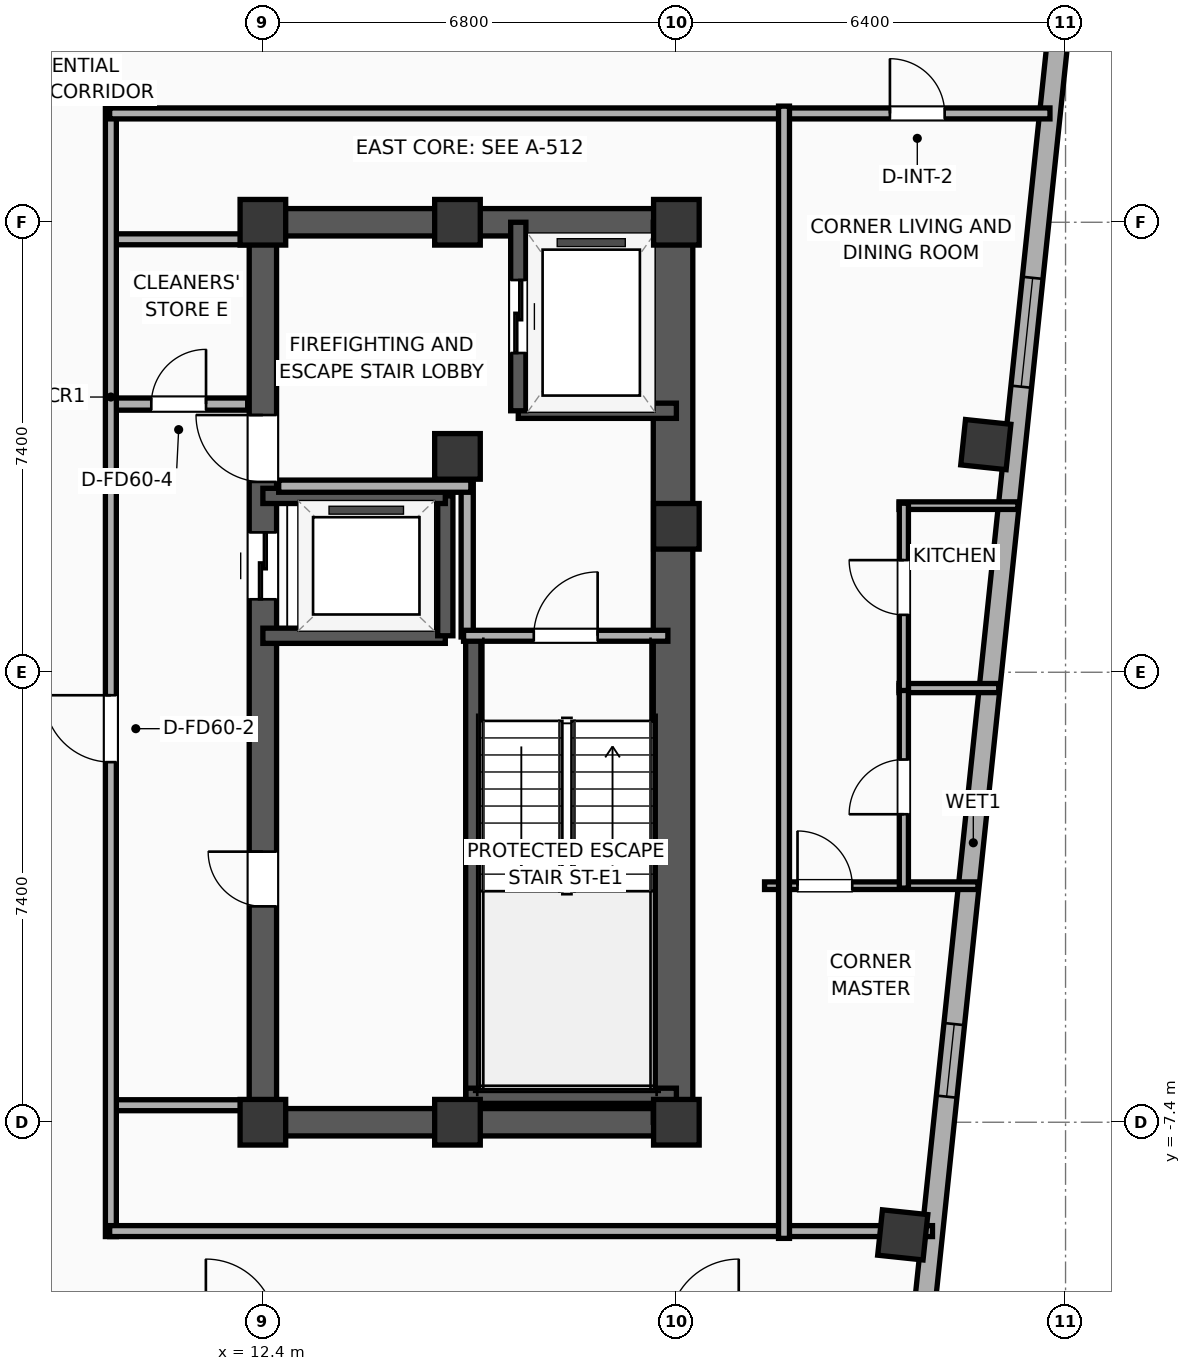
"""IFC4 building model, lengths in metres.
Left out: names, types, materials, properties, quantities, classifications, styles, units other than length and angle.
Written with IfcOpenShell. Run it as: python <this file> out.ifc"""

import sys

from ifc_helpers import new_model, si_unit, direction, frame, frame_2d, origin, origin_2d, place, context, subcontext, project, spatial, rectangle, hollow_rectangle, extrude, element, fill, save


model = new_model("IFC4")
c1 = context("Model", 3, precision=1e-05, world=origin(), true_north=direction((0.0, 1.0)))
c2 = subcontext(c1, "Body", "Model", "MODEL_VIEW")
j1 = project(units=[si_unit("LENGTHUNIT", "METRE"), si_unit("PLANEANGLEUNIT", "RADIAN")], contexts=[c1])
p1 = place(None, origin())
s1 = spatial("IfcSite", under=j1, at=p1, CompositionType="ELEMENT")
p2 = place(p1, origin())
s2 = spatial("IfcBuilding", under=s1, at=p2, CompositionType="ELEMENT")
p3 = place(p2, frame((0.0, 0.0, 283.4)))
s3 = spatial("IfcBuildingStorey", under=s2, at=p3, CompositionType="ELEMENT", Elevation=283.4)
for number, where, z_axis, x_axis in (
    (1, (12.4, -7.4, 0.0), (0.0, 0.0, 1.0), (1.0, 0.0, 0.0)),
    (2, (15.6, 3.55, 0.0), (0.0, 0.0, 1.0), (1.0, 0.0, 0.0)),
    (3, (12.4, 7.4, 0.0), (0.0, 0.0, 1.0), (1.0, 0.0, 0.0)),
    (4, (15.6, -7.4, 0.0), (0.0, 0.0, 1.0), (1.0, 0.0, 0.0)),
    (5, (15.6, 7.4, 0.0), (0.0, 0.0, 1.0), (1.0, 0.0, 0.0)),
    (6, (19.2, -7.4, 0.0), (0.0, 0.0, 1.0), (1.0, 0.0, 0.0)),
    (7, (19.2, 2.4, 0.0), (0.0, 0.0, 1.0), (1.0, 0.0, 0.0)),
    (8, (19.2, 7.4, 0.0), (0.0, 0.0, 1.0), (1.0, 0.0, 0.0)),
):
    element("IfcColumn", number, at=place(p3, frame(where, z_axis=z_axis, x_axis=x_axis)), inside=s3, PredefinedType="COLUMN", context=c2, shape_type="SweptSolid", body=[
        extrude(rectangle(XDim=0.75, YDim=0.75, at=origin_2d()), origin(), (0.0, 0.0, 1.0), 3.9),
    ])
for number, where, z_axis, x_axis in (
    (9, (12.175, -7.4, 0.0), (0.0, 0.0, 1.0), (1.0, 0.0, 0.0)),
    (10, (12.175, 7.4, 0.0), (0.0, 0.0, 1.0), (1.0, 0.0, 0.0)),
):
    element("IfcWall", number, at=place(p3, frame(where, z_axis=z_axis, x_axis=x_axis)), inside=s3, PredefinedType="SHEAR", context=c2, shape_type="SweptSolid", body=[
        extrude(rectangle(XDim=7.25, YDim=0.45, at=frame_2d((3.625, 0.0))), origin(), (0.0, 0.0, 1.0), 3.65),
    ])
p4 = place(p3, frame((12.4, -7.4, 0.0), z_axis=(0.0, 0.0, 1.0), x_axis=(0.0, 1.0, 0.0)))
e11 = element("IfcWall", 11, at=p4, inside=s3, PredefinedType="SHEAR", context=c2, shape_type="SweptSolid", body=[
    extrude(rectangle(XDim=14.8, YDim=0.45, at=frame_2d((7.4, 0.0))), origin(), (0.0, 0.0, 1.0), 3.65),
])
p5 = place(p4, frame((8.6, 0.0, 0.0)))
e12 = element("IfcOpeningElement", 12, at=p5, cuts=e11, PredefinedType="OPENING", context=c2, shape_type="SweptSolid", body=[
    extrude(rectangle(XDim=1.1, YDim=2.05, at=frame_2d((0.55, 1.025))), frame((0.0, 0.235, 0.0), z_axis=(0.0, -1.0, 0.0), x_axis=(1.0, 0.0, 0.0)), (0.0, 0.0, 1.0), 0.47),
])
p6 = place(p4, frame((10.53, 0.0, 0.0)))
e13 = element("IfcOpeningElement", 13, at=p6, cuts=e11, PredefinedType="OPENING", context=c2, shape_type="SweptSolid", body=[
    extrude(rectangle(XDim=1.1, YDim=2.05, at=frame_2d((0.55, 1.025))), frame((0.0, 0.235, 0.0), z_axis=(0.0, -1.0, 0.0), x_axis=(1.0, 0.0, 0.0)), (0.0, 0.0, 1.0), 0.47),
])
p7 = place(p4, frame((3.55, 0.0, 0.0)))
e14 = element("IfcOpeningElement", 14, at=p7, cuts=e11, PredefinedType="OPENING", context=c2, shape_type="SweptSolid", body=[
    extrude(rectangle(XDim=0.9, YDim=2.05, at=frame_2d((0.45, 1.025))), frame((0.0, 0.235, 0.0), z_axis=(0.0, -1.0, 0.0), x_axis=(1.0, 0.0, 0.0)), (0.0, 0.0, 1.0), 0.47),
])
p8 = place(p3, frame((19.145, -7.4, 0.0), z_axis=(0.0, 0.0, 1.0), x_axis=(0.0, 1.0, 0.0)))
e15 = element("IfcWall", 15, at=p8, inside=s3, PredefinedType="SHEAR", context=c2, shape_type="SweptSolid", body=[
    extrude(rectangle(XDim=14.8, YDim=0.65, at=frame_2d((7.4, 0.0))), origin(), (0.0, 0.0, 1.0), 3.65),
])
p9 = place(p3, frame((15.86, -7.085, 0.0), z_axis=(0.0, 0.0, 1.0), x_axis=(0.0, 1.0, 0.0)))
e16 = element("IfcWall", 16, at=p9, inside=s3, PredefinedType="SOLIDWALL", context=c2, shape_type="SweptSolid", body=[
    extrude(rectangle(XDim=7.685, YDim=0.25, at=frame_2d((3.843, 0.0))), origin(), (0.0, 0.0, 1.0), 3.65),
])
p10 = place(p3, frame((15.74, -6.965, 0.0), z_axis=(0.0, 0.0, 1.0), x_axis=(1.0, 0.0, 0.0)))
e17 = element("IfcWall", 17, at=p10, inside=s3, PredefinedType="SOLIDWALL", context=c2, shape_type="SweptSolid", body=[
    extrude(rectangle(XDim=3.46, YDim=0.25, at=frame_2d((1.73, 0.0))), origin(), (0.0, 0.0, 1.0), 3.65),
])
for number, where, z_axis, x_axis in (
    (18, (22.923, -9.252, 0.0), (0.0, 0.0, 1.0), (0.995, -0.105, 0.0)),
    (19, (24.289, 3.744, 0.0), (0.0, 0.0, 1.0), (0.995, -0.105, 0.0)),
):
    element("IfcColumn", number, at=place(p3, frame(where, z_axis=z_axis, x_axis=x_axis)), inside=s3, PredefinedType="COLUMN", context=c2, shape_type="SweptSolid", body=[
        extrude(hollow_rectangle(XDim=0.75, YDim=0.75, WallThickness=0.025, at=origin_2d()), origin(), (0.0, 0.0, 1.0), 3.9),
    ])
p11 = place(p3, frame((25.67, 12.296, 0.0), z_axis=(0.0, 0.0, 1.0), x_axis=(-0.104533282919, -0.994521388791, 0.0)))
e20 = element("IfcWall", 20, at=p11, inside=s3, PredefinedType="ELEMENTEDWALL", context=c2, shape_type="SweptSolid", body=[
    extrude(rectangle(XDim=30.366, YDim=0.34, at=frame_2d((15.183, 0.0))), origin(), (0.0, 0.0, 1.0), 3.65),
])
p12 = place(p11, frame((5.842, 0.0, 0.75)))
e21 = element("IfcOpeningElement", 21, at=p12, cuts=e20, PredefinedType="OPENING", context=c2, shape_type="SweptSolid", body=[
    extrude(rectangle(XDim=1.8, YDim=2.1, at=frame_2d((0.9, 1.05))), frame((0.0, 0.18, 0.0), z_axis=(0.0, -1.0, 0.0), x_axis=(1.0, 0.0, 0.0)), (0.0, 0.0, 1.0), 0.36),
])
p13 = place(p11, frame((23.525, 0.0, 0.75)))
e22 = element("IfcOpeningElement", 22, at=p13, cuts=e20, PredefinedType="OPENING", context=c2, shape_type="SweptSolid", body=[
    extrude(rectangle(XDim=1.8, YDim=2.1, at=frame_2d((0.9, 1.05))), frame((0.0, 0.18, 0.0), z_axis=(0.0, -1.0, 0.0), x_axis=(1.0, 0.0, 0.0)), (0.0, 0.0, 1.0), 0.36),
])
p14 = place(p11, frame((27.368, 0.0, 0.75)))
e23 = element("IfcOpeningElement", 23, at=p14, cuts=e20, PredefinedType="OPENING", context=c2, shape_type="SweptSolid", body=[
    extrude(rectangle(XDim=1.2, YDim=2.05, at=frame_2d((0.6, 1.025))), frame((0.0, 0.18, 0.0), z_axis=(0.0, -1.0, 0.0), x_axis=(1.0, 0.0, 0.0)), (0.0, 0.0, 1.0), 0.36),
])
p15 = place(p11, frame((18.181, 0.0, 0.75)))
e24 = element("IfcOpeningElement", 24, at=p15, cuts=e20, PredefinedType="OPENING", context=c2, shape_type="SweptSolid", body=[
    extrude(rectangle(XDim=1.2, YDim=2.05, at=frame_2d((0.6, 1.025))), frame((0.0, 0.18, 0.0), z_axis=(0.0, -1.0, 0.0), x_axis=(1.0, 0.0, 0.0)), (0.0, 0.0, 1.0), 0.36),
])
p16 = place(p3, frame((16.6, 4.3, 0.0), z_axis=(0.0, 0.0, 1.0), x_axis=(1.0, 0.0, 0.0)))
e25 = element("IfcWall", 25, at=p16, inside=s3, PredefinedType="SOLIDWALL", context=c2, shape_type="SweptSolid", body=[
    extrude(rectangle(XDim=2.6, YDim=0.25, at=frame_2d((1.3, 0.0))), origin(), (0.0, 0.0, 1.0), 3.65),
])
p17 = place(p3, frame((16.6, 7.4, 0.0), z_axis=(0.0, 0.0, 1.0), x_axis=(0.0, -1.0, 0.0)))
e26 = element("IfcWall", 26, at=p17, inside=s3, PredefinedType="SOLIDWALL", context=c2, shape_type="SweptSolid", body=[
    extrude(rectangle(XDim=3.1, YDim=0.25, at=frame_2d((1.55, 0.0))), origin(), (0.0, 0.0, 1.0), 3.65),
])
p18 = place(p17, frame((0.95, 0.0, 0.0)))
e27 = element("IfcOpeningElement", 27, at=p18, cuts=e26, PredefinedType="OPENING", context=c2, shape_type="SweptSolid", body=[
    extrude(rectangle(XDim=1.2, YDim=2.05, at=frame_2d((0.6, 1.025))), frame((0.0, 0.135, 0.0), z_axis=(0.0, -1.0, 0.0), x_axis=(1.0, 0.0, 0.0)), (0.0, 0.0, 1.0), 0.27),
])
p19 = place(p3, frame((12.4, 0.6, 0.0), z_axis=(0.0, 0.0, 1.0), x_axis=(1.0, 0.0, 0.0)))
e28 = element("IfcWall", 28, at=p19, inside=s3, PredefinedType="SOLIDWALL", context=c2, shape_type="SweptSolid", body=[
    extrude(rectangle(XDim=3.0, YDim=0.25, at=frame_2d((1.5, 0.0))), origin(), (0.0, 0.0, 1.0), 3.65),
])
p20 = place(p3, frame((15.4, 0.6, 0.0), z_axis=(0.0, 0.0, 1.0), x_axis=(0.0, 1.0, 0.0)))
e29 = element("IfcWall", 29, at=p20, inside=s3, PredefinedType="SOLIDWALL", context=c2, shape_type="SweptSolid", body=[
    extrude(rectangle(XDim=2.3, YDim=0.25, at=frame_2d((1.15, 0.0))), origin(), (0.0, 0.0, 1.0), 3.65),
])
p21 = place(p3, frame((15.4, 2.9, 0.0), z_axis=(0.0, 0.0, 1.0), x_axis=(-1.0, 0.0, 0.0)))
e30 = element("IfcWall", 30, at=p21, inside=s3, PredefinedType="SOLIDWALL", context=c2, shape_type="SweptSolid", body=[
    extrude(rectangle(XDim=3.0, YDim=0.25, at=frame_2d((1.5, 0.0))), origin(), (0.0, 0.0, 1.0), 3.65),
])
p22 = place(p3, frame((15.76, 0.58, 0.0), z_axis=(0.0, 0.0, 1.0), x_axis=(0.0, 1.0, 0.0)))
e31 = element("IfcWall", 31, at=p22, inside=s3, PredefinedType="PARTITIONING", context=c2, shape_type="SweptSolid", body=[
    extrude(rectangle(XDim=2.52, YDim=0.2, at=frame_2d((1.26, 0.0))), origin(), (0.0, 0.0, 1.0), 3.65),
])
p23 = place(p3, frame((12.66, 3.06, 0.0), z_axis=(0.0, 0.0, 1.0), x_axis=(1.0, 0.0, 0.0)))
e32 = element("IfcWall", 32, at=p23, inside=s3, PredefinedType="PARTITIONING", context=c2, shape_type="SweptSolid", body=[
    extrude(rectangle(XDim=3.16, YDim=0.2, at=frame_2d((1.58, 0.0))), origin(), (0.0, 0.0, 1.0), 3.65),
])
p24 = place(p3, frame((15.7, 0.6, 0.0), z_axis=(0.0, 0.0, 1.0), x_axis=(1.0, 0.0, 0.0)))
e33 = element("IfcWall", 33, at=p24, inside=s3, PredefinedType="PARTITIONING", context=c2, shape_type="SweptSolid", body=[
    extrude(rectangle(XDim=3.36, YDim=0.18, at=frame_2d((1.68, 0.0))), origin(), (0.0, 0.0, 1.0), 3.65),
])
p25 = place(p24, frame((1.155, 0.0, 0.0)))
e34 = element("IfcOpeningElement", 34, at=p25, cuts=e33, PredefinedType="OPENING", context=c2, shape_type="SweptSolid", body=[
    extrude(rectangle(XDim=1.05, YDim=2.05, at=frame_2d((0.525, 1.025))), frame((0.0, 0.1, 0.0), z_axis=(0.0, -1.0, 0.0), x_axis=(1.0, 0.0, 0.0)), (0.0, 0.0, 1.0), 0.2),
])
p26 = place(p3, frame((9.88, 4.41, 0.0), z_axis=(0.0, 0.0, 1.0), x_axis=(1.0, 0.0, 0.0)))
e35 = element("IfcWall", 35, at=p26, inside=s3, PredefinedType="PARTITIONING", context=c2, shape_type="SweptSolid", body=[
    extrude(rectangle(XDim=2.27, YDim=0.2, at=frame_2d((1.135, 0.0))), origin(), (0.0, 0.0, 1.0), 3.65),
])
p27 = place(p26, frame((0.685, 0.0, 0.0)))
e36 = element("IfcOpeningElement", 36, at=p27, cuts=e35, PredefinedType="OPENING", context=c2, shape_type="SweptSolid", body=[
    extrude(rectangle(XDim=0.9, YDim=2.05, at=frame_2d((0.45, 1.025))), frame((0.0, 0.11, 0.0), z_axis=(0.0, -1.0, 0.0), x_axis=(1.0, 0.0, 0.0)), (0.0, 0.0, 1.0), 0.22),
])
for number, where, z_axis, x_axis in (
    (37, (9.88, 7.12, 0.0), (0.0, 0.0, 1.0), (1.0, 0.0, 0.0)),
    (38, (9.88, -7.12, 0.0), (0.0, 0.0, 1.0), (1.0, 0.0, 0.0)),
):
    element("IfcWall", number, at=place(p3, frame(where, z_axis=z_axis, x_axis=x_axis)), inside=s3, PredefinedType="PARTITIONING", context=c2, shape_type="SweptSolid", body=[
        extrude(rectangle(XDim=2.27, YDim=0.18, at=frame_2d((1.135, 0.0))), origin(), (0.0, 0.0, 1.0), 3.65),
    ])
p28 = place(p3, frame((9.9, -9.28, 0.0), z_axis=(0.0, 0.0, 1.0), x_axis=(0.0, 1.0, 0.0)))
e39 = element("IfcWall", 39, at=p28, inside=s3, PredefinedType="PARTITIONING", context=c2, shape_type="SweptSolid", body=[
    extrude(rectangle(XDim=18.56, YDim=0.18, at=frame_2d((9.28, 0.0))), origin(), (0.0, 0.0, 1.0), 3.65),
])
p29 = place(p28, frame((7.802, 0.0, 0.0)))
e40 = element("IfcOpeningElement", 40, at=p29, cuts=e39, PredefinedType="OPENING", context=c2, shape_type="SweptSolid", body=[
    extrude(rectangle(XDim=1.1, YDim=2.05, at=frame_2d((0.55, 1.025))), frame((0.0, 0.1, 0.0), z_axis=(0.0, -1.0, 0.0), x_axis=(1.0, 0.0, 0.0)), (0.0, 0.0, 1.0), 0.2),
])
p30 = place(p3, frame((9.88, 9.19, 0.0), z_axis=(0.0, 0.0, 1.0), x_axis=(1.0, 0.0, 0.0)))
e41 = element("IfcWall", 41, at=p30, inside=s3, PredefinedType="PARTITIONING", context=c2, shape_type="SweptSolid", body=[
    extrude(rectangle(XDim=15.464, YDim=0.18, at=frame_2d((7.732, 0.0))), origin(), (0.0, 0.0, 1.0), 3.65),
])
p31 = place(p30, frame((12.832, 0.0, 0.0)))
e42 = element("IfcOpeningElement", 42, at=p31, cuts=e41, PredefinedType="OPENING", context=c2, shape_type="SweptSolid", body=[
    extrude(rectangle(XDim=0.9, YDim=2.05, at=frame_2d((0.45, 1.025))), frame((0.0, 0.1, 0.0), z_axis=(0.0, -1.0, 0.0), x_axis=(1.0, 0.0, 0.0)), (0.0, 0.0, 1.0), 0.2),
])
p32 = place(p3, frame((9.88, -9.19, 0.0), z_axis=(0.0, 0.0, 1.0), x_axis=(1.0, 0.0, 0.0)))
e43 = element("IfcWall", 43, at=p32, inside=s3, PredefinedType="PARTITIONING", context=c2, shape_type="SweptSolid", body=[
    extrude(rectangle(XDim=13.532, YDim=0.18, at=frame_2d((6.766, 0.0))), origin(), (0.0, 0.0, 1.0), 3.65),
])
p33 = place(p3, frame((22.861, 2.74, 0.0), z_axis=(0.0, 0.0, 1.0), x_axis=(1.0, 0.0, 0.0)))
e44 = element("IfcWall", 44, at=p33, inside=s3, PredefinedType="PARTITIONING", context=c2, shape_type="SweptSolid", body=[
    extrude(rectangle(XDim=1.956, YDim=0.125, at=frame_2d((0.978, 0.0))), origin(), (0.0, 0.0, 1.0), 3.65),
])
p34 = place(p3, frame((22.861, -0.26, 0.0), z_axis=(0.0, 0.0, 1.0), x_axis=(1.0, 0.0, 0.0)))
e45 = element("IfcWall", 45, at=p34, inside=s3, PredefinedType="PLUMBINGWALL", context=c2, shape_type="SweptSolid", body=[
    extrude(rectangle(XDim=1.64, YDim=0.15, at=frame_2d((0.82, 0.0))), origin(), (0.0, 0.0, 1.0), 3.65),
])
p35 = place(p3, frame((20.65, -3.51, 0.0), z_axis=(0.0, 0.0, 1.0), x_axis=(1.0, 0.0, 0.0)))
e46 = element("IfcWall", 46, at=p35, inside=s3, PredefinedType="PARTITIONING", context=c2, shape_type="SweptSolid", body=[
    extrude(rectangle(XDim=3.51, YDim=0.125, at=frame_2d((1.755, 0.0))), origin(), (0.0, 0.0, 1.0), 3.65),
])
p36 = place(p35, frame((0.542, 0.0, 0.0)))
e47 = element("IfcOpeningElement", 47, at=p36, cuts=e46, PredefinedType="OPENING", context=c2, shape_type="SweptSolid", body=[
    extrude(rectangle(XDim=0.9, YDim=2.05, at=frame_2d((0.45, 1.025))), frame((0.0, 0.073, 0.0), z_axis=(0.0, -1.0, 0.0), x_axis=(1.0, 0.0, 0.0)), (0.0, 0.0, 1.0), 0.145),
])
p37 = place(p3, frame((22.941, -3.55, 0.0), z_axis=(0.0, 0.0, 1.0), x_axis=(0.0, 1.0, 0.0)))
e48 = element("IfcWall", 48, at=p37, inside=s3, PredefinedType="PLUMBINGWALL", context=c2, shape_type="SweptSolid", body=[
    extrude(rectangle(XDim=3.33, YDim=0.15, at=frame_2d((1.665, 0.0))), origin(), (0.0, 0.0, 1.0), 3.65),
])
p38 = place(p37, frame((1.215, 0.0, 0.0)))
e49 = element("IfcOpeningElement", 49, at=p38, cuts=e48, PredefinedType="OPENING", context=c2, shape_type="SweptSolid", body=[
    extrude(rectangle(XDim=0.9, YDim=2.05, at=frame_2d((0.45, 1.025))), frame((0.0, 0.085, 0.0), z_axis=(0.0, -1.0, 0.0), x_axis=(1.0, 0.0, 0.0)), (0.0, 0.0, 1.0), 0.17),
])
p39 = place(p3, frame((22.941, -0.3, 0.0), z_axis=(0.0, 0.0, 1.0), x_axis=(0.0, 1.0, 0.0)))
e50 = element("IfcWall", 50, at=p39, inside=s3, PredefinedType="PLUMBINGWALL", context=c2, shape_type="SweptSolid", body=[
    extrude(rectangle(XDim=3.08, YDim=0.15, at=frame_2d((1.54, 0.0))), origin(), (0.0, 0.0, 1.0), 3.65),
])
p40 = place(p39, frame((1.244, 0.0, 0.0)))
e51 = element("IfcOpeningElement", 51, at=p40, cuts=e50, PredefinedType="OPENING", context=c2, shape_type="SweptSolid", body=[
    extrude(rectangle(XDim=0.9, YDim=2.05, at=frame_2d((0.45, 1.025))), frame((0.0, 0.085, 0.0), z_axis=(0.0, -1.0, 0.0), x_axis=(1.0, 0.0, 0.0)), (0.0, 0.0, 1.0), 0.17),
])
p41 = place(p3, frame((20.97, -9.31, 0.0), z_axis=(0.0, 0.0, 1.0), x_axis=(0.0, 1.0, 0.0)))
e52 = element("IfcWall", 52, at=p41, inside=s3, PredefinedType="PARTITIONING", context=c2, shape_type="SweptSolid", body=[
    extrude(rectangle(XDim=18.62, YDim=0.18, at=frame_2d((9.31, 0.0))), origin(), (0.0, 0.0, 1.0), 3.65),
])
p42 = place(p12, origin())
e53 = element("IfcWindow", 53, at=p42, inside=s3, PartitioningType="SINGLE_PANEL", PredefinedType="WINDOW", context=c2, shape_type="SweptSolid", body=[
    extrude(rectangle(XDim=1.8, YDim=2.1, at=frame_2d((0.9, 1.05))), frame((0.0, 0.03, 0.0), z_axis=(0.0, -1.0, 0.0), x_axis=(1.0, 0.0, 0.0)), (0.0, 0.0, 1.0), 0.06),
])
fill(e21, e53)
p43 = place(p15, origin())
e54 = element("IfcWindow", 54, at=p43, inside=s3, PartitioningType="SINGLE_PANEL", PredefinedType="WINDOW", context=c2, shape_type="SweptSolid", body=[
    extrude(rectangle(XDim=1.2, YDim=2.05, at=frame_2d((0.6, 1.025))), frame((0.0, 0.03, 0.0), z_axis=(0.0, -1.0, 0.0), x_axis=(1.0, 0.0, 0.0)), (0.0, 0.0, 1.0), 0.06),
])
fill(e24, e54)
p44 = place(p18, origin())
e55 = element("IfcDoor", 55, at=p44, inside=s3, OperationType="SLIDING_TO_LEFT", PredefinedType="DOOR", context=c2, shape_type="SweptSolid", body=[
    extrude(rectangle(XDim=1.2, YDim=2.05, at=frame_2d((0.6, 1.025))), frame((0.0, 0.025, 0.0), z_axis=(0.0, -1.0, 0.0), x_axis=(1.0, 0.0, 0.0)), (0.0, 0.0, 1.0), 0.05),
])
fill(e27, e55)
p45 = place(p5, origin())
e56 = element("IfcDoor", 56, at=p45, inside=s3, OperationType="SLIDING_TO_LEFT", PredefinedType="DOOR", context=c2, shape_type="SweptSolid", body=[
    extrude(rectangle(XDim=1.1, YDim=2.05, at=frame_2d((0.55, 1.025))), frame((0.0, 0.025, 0.0), z_axis=(0.0, -1.0, 0.0), x_axis=(1.0, 0.0, 0.0)), (0.0, 0.0, 1.0), 0.05),
])
fill(e12, e56)
p46 = place(p25, origin())
e57 = element("IfcDoor", 57, at=p46, inside=s3, OperationType="SINGLE_SWING_RIGHT", PredefinedType="DOOR", context=c2, shape_type="SweptSolid", body=[
    extrude(rectangle(XDim=1.05, YDim=2.05, at=frame_2d((0.525, 1.025))), frame((0.0, 0.025, 0.0), z_axis=(0.0, -1.0, 0.0), x_axis=(1.0, 0.0, 0.0)), (0.0, 0.0, 1.0), 0.05),
])
fill(e34, e57)
p47 = place(p27, origin())
e58 = element("IfcDoor", 58, at=p47, inside=s3, OperationType="SINGLE_SWING_RIGHT", PredefinedType="DOOR", context=c2, shape_type="SweptSolid", body=[
    extrude(rectangle(XDim=0.9, YDim=2.05, at=frame_2d((0.45, 1.025))), frame((0.0, 0.025, 0.0), z_axis=(0.0, -1.0, 0.0), x_axis=(1.0, 0.0, 0.0)), (0.0, 0.0, 1.0), 0.05),
])
fill(e36, e58)
p48 = place(p29, origin())
e59 = element("IfcDoor", 59, at=p48, inside=s3, OperationType="SINGLE_SWING_RIGHT", PredefinedType="DOOR", context=c2, shape_type="SweptSolid", body=[
    extrude(rectangle(XDim=1.1, YDim=2.05, at=frame_2d((0.55, 1.025))), frame((0.0, 0.025, 0.0), z_axis=(0.0, -1.0, 0.0), x_axis=(1.0, 0.0, 0.0)), (0.0, 0.0, 1.0), 0.05),
])
fill(e40, e59)
p49 = place(p31, origin())
e60 = element("IfcDoor", 60, at=p49, inside=s3, OperationType="SINGLE_SWING_LEFT", PredefinedType="DOOR", context=c2, shape_type="SweptSolid", body=[
    extrude(rectangle(XDim=0.9, YDim=2.05, at=frame_2d((0.45, 1.025))), frame((0.0, 0.025, 0.0), z_axis=(0.0, -1.0, 0.0), x_axis=(1.0, 0.0, 0.0)), (0.0, 0.0, 1.0), 0.05),
])
fill(e42, e60)
p50 = place(p36, origin())
e61 = element("IfcDoor", 61, at=p50, inside=s3, OperationType="SINGLE_SWING_LEFT", PredefinedType="DOOR", context=c2, shape_type="SweptSolid", body=[
    extrude(rectangle(XDim=0.9, YDim=2.05, at=frame_2d((0.45, 1.025))), frame((0.0, 0.025, 0.0), z_axis=(0.0, -1.0, 0.0), x_axis=(1.0, 0.0, 0.0)), (0.0, 0.0, 1.0), 0.05),
])
fill(e47, e61)
p51 = place(p38, origin())
e62 = element("IfcDoor", 62, at=p51, inside=s3, OperationType="SINGLE_SWING_LEFT", PredefinedType="DOOR", context=c2, shape_type="SweptSolid", body=[
    extrude(rectangle(XDim=0.9, YDim=2.05, at=frame_2d((0.45, 1.025))), frame((0.0, 0.025, 0.0), z_axis=(0.0, -1.0, 0.0), x_axis=(1.0, 0.0, 0.0)), (0.0, 0.0, 1.0), 0.05),
])
fill(e49, e62)
p52 = place(p40, origin())
e63 = element("IfcDoor", 63, at=p52, inside=s3, OperationType="SINGLE_SWING_RIGHT", PredefinedType="DOOR", context=c2, shape_type="SweptSolid", body=[
    extrude(rectangle(XDim=0.9, YDim=2.05, at=frame_2d((0.45, 1.025))), frame((0.0, 0.025, 0.0), z_axis=(0.0, -1.0, 0.0), x_axis=(1.0, 0.0, 0.0)), (0.0, 0.0, 1.0), 0.05),
])
fill(e51, e63)
p53 = place(p6, origin())
e64 = element("IfcDoor", 64, at=p53, inside=s3, OperationType="SINGLE_SWING_RIGHT", PredefinedType="DOOR", context=c2, shape_type="SweptSolid", body=[
    extrude(rectangle(XDim=1.1, YDim=2.05, at=frame_2d((0.55, 1.025))), frame((0.0, 0.025, 0.0), z_axis=(0.0, -1.0, 0.0), x_axis=(1.0, 0.0, 0.0)), (0.0, 0.0, 1.0), 0.05),
])
fill(e13, e64)
p54 = place(p7, origin())
e65 = element("IfcDoor", 65, at=p54, inside=s3, OperationType="SINGLE_SWING_RIGHT", PredefinedType="DOOR", context=c2, shape_type="SweptSolid", body=[
    extrude(rectangle(XDim=0.9, YDim=2.05, at=frame_2d((0.45, 1.025))), frame((0.0, 0.025, 0.0), z_axis=(0.0, -1.0, 0.0), x_axis=(1.0, 0.0, 0.0)), (0.0, 0.0, 1.0), 0.05),
])
fill(e14, e65)
save(model, sys.argv[1])
